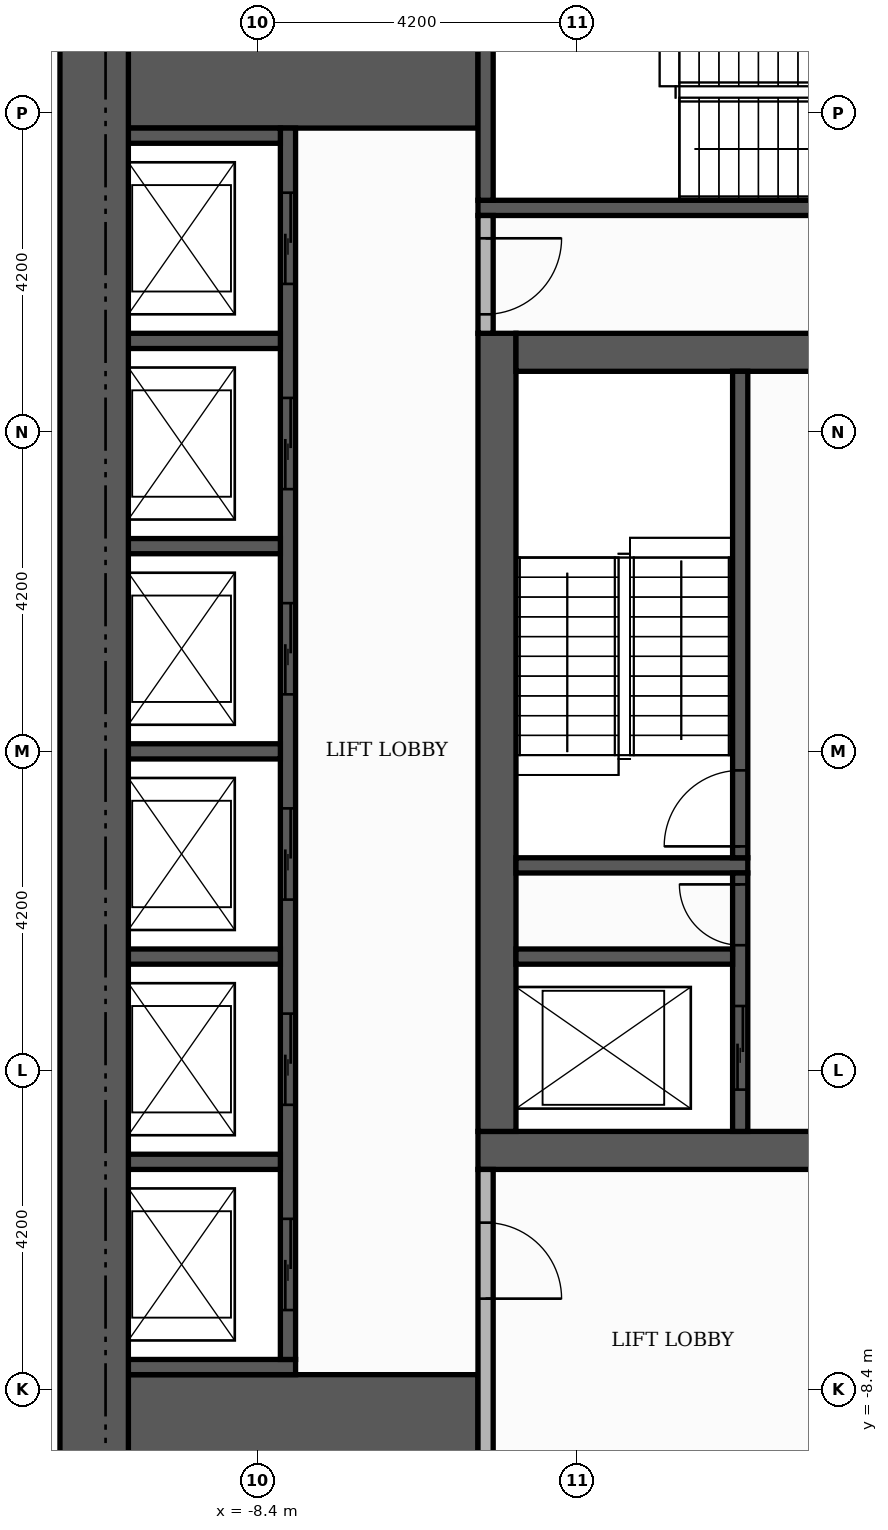
"""IFC4 building model, lengths in metres.
Left out: names, types, materials, properties, quantities, classifications, styles, units other than length and angle.
Written with IfcOpenShell. Run it as: python <this file> out.ifc"""

import sys

from ifc_helpers import new_model, si_unit, direction, frame, frame_2d, origin, place, context, subcontext, project, spatial, rectangle, extrude, element, fill, save


model = new_model("IFC4")
c1 = context("Model", 3, precision=1e-05, world=origin(), true_north=direction((0.0, 1.0)))
c2 = subcontext(c1, "Body", "Model", "MODEL_VIEW")
j1 = project(units=[si_unit("LENGTHUNIT", "METRE"), si_unit("PLANEANGLEUNIT", "RADIAN")], contexts=[c1])
p1 = place(None, origin())
s1 = spatial("IfcSite", under=j1, at=p1, CompositionType="ELEMENT")
p2 = place(p1, origin())
s2 = spatial("IfcBuilding", under=s1, at=p2, CompositionType="ELEMENT")
p3 = place(p2, frame((0.0, 0.0, 126.0)))
s3 = spatial("IfcBuildingStorey", under=s2, at=p3, CompositionType="ELEMENT", Elevation=126.0)
p4 = place(p3, frame((-5.5, -5.25, 0.0), z_axis=(0.0, 0.0, 1.0), x_axis=(1.0, 0.0, 0.0)))
e1 = element("IfcWall", 1, at=p4, inside=s3, PredefinedType="SHEAR", context=c2, shape_type="SweptSolid", body=[
    extrude(rectangle(XDim=11.0, YDim=0.5, at=frame_2d((5.5, 0.0))), origin(), (0.0, 0.0, 1.0), 7.38),
])
p5 = place(p4, frame((4.9, 0.0, 0.0)))
e2 = element("IfcOpeningElement", 2, at=p5, cuts=e1, PredefinedType="OPENING", context=c2, shape_type="SweptSolid", body=[
    extrude(rectangle(XDim=1.2, YDim=2.1, at=frame_2d((0.6, 1.05))), frame((0.0, 0.26, 0.0), z_axis=(0.0, -1.0, 0.0), x_axis=(1.0, 0.0, 0.0)), (0.0, 0.0, 1.0), 0.52),
])
p6 = place(p3, frame((-5.25, -5.0, 0.0), z_axis=(0.0, 0.0, 1.0), x_axis=(0.0, 1.0, 0.0)))
e3 = element("IfcWall", 3, at=p6, inside=s3, PredefinedType="SHEAR", context=c2, shape_type="SweptSolid", body=[
    extrude(rectangle(XDim=10.5, YDim=0.5, at=frame_2d((5.25, 0.0))), origin(), (0.0, 0.0, 1.0), 7.38),
])
p7 = place(p3, frame((-5.0, 5.25, 0.0), z_axis=(0.0, 0.0, 1.0), x_axis=(1.0, 0.0, 0.0)))
e4 = element("IfcWall", 4, at=p7, inside=s3, PredefinedType="SHEAR", context=c2, shape_type="SweptSolid", body=[
    extrude(rectangle(XDim=10.0, YDim=0.5, at=frame_2d((5.0, 0.0))), origin(), (0.0, 0.0, 1.0), 7.38),
])
p8 = place(p7, frame((4.4, 0.0, 0.0)))
e5 = element("IfcOpeningElement", 5, at=p8, cuts=e4, PredefinedType="OPENING", context=c2, shape_type="SweptSolid", body=[
    extrude(rectangle(XDim=1.2, YDim=2.1, at=frame_2d((0.6, 1.05))), frame((0.0, 0.26, 0.0), z_axis=(0.0, -1.0, 0.0), x_axis=(1.0, 0.0, 0.0)), (0.0, 0.0, 1.0), 0.52),
])
for number, where, z_axis, x_axis in (
    (6, (-10.1, -9.15, 0.0), (0.0, 0.0, 1.0), (1.0, 0.0, 0.0)),
    (7, (-10.1, 9.15, 0.0), (0.0, 0.0, 1.0), (1.0, 0.0, 0.0)),
):
    element("IfcWall", number, at=place(p3, frame(where, z_axis=z_axis, x_axis=x_axis)), inside=s3, PredefinedType="SHEAR", context=c2, shape_type="SweptSolid", body=[
        extrude(rectangle(XDim=4.6, YDim=1.9, at=frame_2d((2.3, 0.0))), origin(), (0.0, 0.0, 1.0), 7.38),
    ])
p9 = place(p3, frame((-5.0, -1.5, 0.0), z_axis=(0.0, 0.0, 1.0), x_axis=(1.0, 0.0, 0.0)))
e8 = element("IfcWall", 8, at=p9, inside=s3, PredefinedType="SHEAR", context=c2, shape_type="SweptSolid", body=[
    extrude(rectangle(XDim=3.05, YDim=0.2, at=frame_2d((1.525, 0.0))), origin(), (0.0, 0.0, 1.0), 7.38),
])
p10 = place(p3, frame((-2.05, -1.4, 0.0), z_axis=(0.0, 0.0, 1.0), x_axis=(0.0, 1.0, 0.0)))
e9 = element("IfcWall", 9, at=p10, inside=s3, PredefinedType="SHEAR", context=c2, shape_type="SweptSolid", body=[
    extrude(rectangle(XDim=6.4, YDim=0.2, at=frame_2d((3.2, 0.0))), origin(), (0.0, 0.0, 1.0), 7.38),
])
p11 = place(p10, frame((0.15, 0.0, 0.0)))
e10 = element("IfcOpeningElement", 10, at=p11, cuts=e9, PredefinedType="OPENING", context=c2, shape_type="SweptSolid", body=[
    extrude(rectangle(XDim=1.0, YDim=2.1, at=frame_2d((0.5, 1.05))), frame((0.0, 0.11, 0.0), z_axis=(0.0, -1.0, 0.0), x_axis=(1.0, 0.0, 0.0)), (0.0, 0.0, 1.0), 0.22),
])
p12 = place(p3, frame((-5.5, 7.15, 0.0), z_axis=(0.0, 0.0, 1.0), x_axis=(1.0, 0.0, 0.0)))
e11 = element("IfcWall", 11, at=p12, inside=s3, PredefinedType="SHEAR", context=c2, shape_type="SweptSolid", body=[
    extrude(rectangle(XDim=6.8, YDim=0.2, at=frame_2d((3.4, 0.0))), origin(), (0.0, 0.0, 1.0), 7.38),
])
p13 = place(p3, frame((-5.4, 7.25, 0.0), z_axis=(0.0, 0.0, 1.0), x_axis=(0.0, 1.0, 0.0)))
e12 = element("IfcWall", 12, at=p13, inside=s3, PredefinedType="SHEAR", context=c2, shape_type="SweptSolid", body=[
    extrude(rectangle(XDim=2.85, YDim=0.2, at=frame_2d((1.425, 0.0))), origin(), (0.0, 0.0, 1.0), 7.38),
])
p14 = place(p3, frame((-10.1, -8.1, 0.0), z_axis=(0.0, 0.0, 1.0), x_axis=(1.0, 0.0, 0.0)))
e13 = element("IfcWall", 13, at=p14, inside=s3, PredefinedType="SHEAR", context=c2, shape_type="SweptSolid", body=[
    extrude(rectangle(XDim=2.2, YDim=0.2, at=frame_2d((1.1, 0.0))), origin(), (0.0, 0.0, 1.0), 7.38),
])
p15 = place(p3, frame((-8.0, -8.0, 0.0), z_axis=(0.0, 0.0, 1.0), x_axis=(0.0, 1.0, 0.0)))
e14 = element("IfcWall", 14, at=p15, inside=s3, PredefinedType="SHEAR", context=c2, shape_type="SweptSolid", body=[
    extrude(rectangle(XDim=16.2, YDim=0.2, at=frame_2d((8.1, 0.0))), origin(), (0.0, 0.0, 1.0), 7.38),
])
p16 = place(p15, frame((0.65, 0.0, 0.0)))
e15 = element("IfcOpeningElement", 15, at=p16, cuts=e14, PredefinedType="OPENING", context=c2, shape_type="SweptSolid", body=[
    extrude(rectangle(XDim=1.2, YDim=2.1, at=frame_2d((0.6, 1.05))), frame((0.0, 0.11, 0.0), z_axis=(0.0, -1.0, 0.0), x_axis=(1.0, 0.0, 0.0)), (0.0, 0.0, 1.0), 0.22),
])
p17 = place(p15, frame((3.35, 0.0, 0.0)))
e16 = element("IfcOpeningElement", 16, at=p17, cuts=e14, PredefinedType="OPENING", context=c2, shape_type="SweptSolid", body=[
    extrude(rectangle(XDim=1.2, YDim=2.1, at=frame_2d((0.6, 1.05))), frame((0.0, 0.11, 0.0), z_axis=(0.0, -1.0, 0.0), x_axis=(1.0, 0.0, 0.0)), (0.0, 0.0, 1.0), 0.22),
])
p18 = place(p15, frame((6.05, 0.0, 0.0)))
e17 = element("IfcOpeningElement", 17, at=p18, cuts=e14, PredefinedType="OPENING", context=c2, shape_type="SweptSolid", body=[
    extrude(rectangle(XDim=1.2, YDim=2.1, at=frame_2d((0.6, 1.05))), frame((0.0, 0.11, 0.0), z_axis=(0.0, -1.0, 0.0), x_axis=(1.0, 0.0, 0.0)), (0.0, 0.0, 1.0), 0.22),
])
p19 = place(p15, frame((8.75, 0.0, 0.0)))
e18 = element("IfcOpeningElement", 18, at=p19, cuts=e14, PredefinedType="OPENING", context=c2, shape_type="SweptSolid", body=[
    extrude(rectangle(XDim=1.2, YDim=2.1, at=frame_2d((0.6, 1.05))), frame((0.0, 0.11, 0.0), z_axis=(0.0, -1.0, 0.0), x_axis=(1.0, 0.0, 0.0)), (0.0, 0.0, 1.0), 0.22),
])
p20 = place(p15, frame((11.45, 0.0, 0.0)))
e19 = element("IfcOpeningElement", 19, at=p20, cuts=e14, PredefinedType="OPENING", context=c2, shape_type="SweptSolid", body=[
    extrude(rectangle(XDim=1.2, YDim=2.1, at=frame_2d((0.6, 1.05))), frame((0.0, 0.11, 0.0), z_axis=(0.0, -1.0, 0.0), x_axis=(1.0, 0.0, 0.0)), (0.0, 0.0, 1.0), 0.22),
])
p21 = place(p15, frame((14.15, 0.0, 0.0)))
e20 = element("IfcOpeningElement", 20, at=p21, cuts=e14, PredefinedType="OPENING", context=c2, shape_type="SweptSolid", body=[
    extrude(rectangle(XDim=1.2, YDim=2.1, at=frame_2d((0.6, 1.05))), frame((0.0, 0.11, 0.0), z_axis=(0.0, -1.0, 0.0), x_axis=(1.0, 0.0, 0.0)), (0.0, 0.0, 1.0), 0.22),
])
p22 = place(p3, frame((-10.1, -5.4, 0.0), z_axis=(0.0, 0.0, 1.0), x_axis=(1.0, 0.0, 0.0)))
e21 = element("IfcWall", 21, at=p22, inside=s3, PredefinedType="SHEAR", context=c2, shape_type="SweptSolid", body=[
    extrude(rectangle(XDim=2.0, YDim=0.2, at=frame_2d((1.0, 0.0))), origin(), (0.0, 0.0, 1.0), 7.38),
])
p23 = place(p3, frame((-2.05, -5.0, 0.0), z_axis=(0.0, 0.0, 1.0), x_axis=(0.0, 1.0, 0.0)))
e22 = element("IfcWall", 22, at=p23, inside=s3, PredefinedType="SHEAR", context=c2, shape_type="SweptSolid", body=[
    extrude(rectangle(XDim=3.4, YDim=0.2, at=frame_2d((1.7, 0.0))), origin(), (0.0, 0.0, 1.0), 7.38),
])
p24 = place(p23, frame((0.55, 0.0, 0.0)))
e23 = element("IfcOpeningElement", 23, at=p24, cuts=e22, PredefinedType="OPENING", context=c2, shape_type="SweptSolid", body=[
    extrude(rectangle(XDim=1.1, YDim=2.1, at=frame_2d((0.55, 1.05))), frame((0.0, 0.11, 0.0), z_axis=(0.0, -1.0, 0.0), x_axis=(1.0, 0.0, 0.0)), (0.0, 0.0, 1.0), 0.22),
])
p25 = place(p23, frame((2.45, 0.0, 0.0)))
e24 = element("IfcOpeningElement", 24, at=p25, cuts=e22, PredefinedType="OPENING", context=c2, shape_type="SweptSolid", body=[
    extrude(rectangle(XDim=0.8, YDim=2.1, at=frame_2d((0.4, 1.05))), frame((0.0, 0.11, 0.0), z_axis=(0.0, -1.0, 0.0), x_axis=(1.0, 0.0, 0.0)), (0.0, 0.0, 1.0), 0.22),
])
p26 = place(p3, frame((-10.1, -2.7, 0.0), z_axis=(0.0, 0.0, 1.0), x_axis=(1.0, 0.0, 0.0)))
e25 = element("IfcWall", 25, at=p26, inside=s3, PredefinedType="SHEAR", context=c2, shape_type="SweptSolid", body=[
    extrude(rectangle(XDim=2.0, YDim=0.2, at=frame_2d((1.0, 0.0))), origin(), (0.0, 0.0, 1.0), 7.38),
])
p27 = place(p3, frame((-5.0, -2.7, 0.0), z_axis=(0.0, 0.0, 1.0), x_axis=(1.0, 0.0, 0.0)))
e26 = element("IfcWall", 26, at=p27, inside=s3, PredefinedType="SHEAR", context=c2, shape_type="SweptSolid", body=[
    extrude(rectangle(XDim=2.85, YDim=0.2, at=frame_2d((1.425, 0.0))), origin(), (0.0, 0.0, 1.0), 7.38),
])
for number, where, z_axis, x_axis in (
    (27, (-10.1, 0.0, 0.0), (0.0, 0.0, 1.0), (1.0, 0.0, 0.0)),
    (28, (-10.1, 2.7, 0.0), (0.0, 0.0, 1.0), (1.0, 0.0, 0.0)),
    (29, (-10.1, 5.4, 0.0), (0.0, 0.0, 1.0), (1.0, 0.0, 0.0)),
    (30, (-10.1, 8.1, 0.0), (0.0, 0.0, 1.0), (1.0, 0.0, 0.0)),
):
    element("IfcWall", number, at=place(p3, frame(where, z_axis=z_axis, x_axis=x_axis)), inside=s3, PredefinedType="SHEAR", context=c2, shape_type="SweptSolid", body=[
        extrude(rectangle(XDim=2.0, YDim=0.2, at=frame_2d((1.0, 0.0))), origin(), (0.0, 0.0, 1.0), 7.38),
    ])
p28 = place(p3, frame((-10.55, -10.1, 0.0), z_axis=(0.0, 0.0, 1.0), x_axis=(0.0, 1.0, 0.0)))
e31 = element("IfcWall", 31, at=p28, inside=s3, PredefinedType="SHEAR", context=c2, shape_type="SweptSolid", body=[
    extrude(rectangle(XDim=20.2, YDim=0.9, at=frame_2d((10.1, 0.0))), origin(), (0.0, 0.0, 1.0), 7.38),
])
p29 = place(p3, frame((-5.4, -10.1, 0.0), z_axis=(0.0, 0.0, 1.0), x_axis=(0.0, 1.0, 0.0)))
e32 = element("IfcWall", 32, at=p29, inside=s3, PredefinedType="PARTITIONING", context=c2, shape_type="SweptSolid", body=[
    extrude(rectangle(XDim=4.6, YDim=0.2, at=frame_2d((2.3, 0.0))), origin(), (0.0, 0.0, 1.0), 7.38),
])
p30 = place(p29, frame((2.9, 0.0, 0.0)))
e33 = element("IfcOpeningElement", 33, at=p30, cuts=e32, PredefinedType="OPENING", context=c2, shape_type="SweptSolid", body=[
    extrude(rectangle(XDim=1.0, YDim=2.1, at=frame_2d((0.5, 1.05))), frame((0.0, 0.11, 0.0), z_axis=(0.0, -1.0, 0.0), x_axis=(1.0, 0.0, 0.0)), (0.0, 0.0, 1.0), 0.22),
])
p31 = place(p3, frame((-5.4, 5.5, 0.0), z_axis=(0.0, 0.0, 1.0), x_axis=(0.0, 1.0, 0.0)))
e34 = element("IfcWall", 34, at=p31, inside=s3, PredefinedType="PARTITIONING", context=c2, shape_type="SweptSolid", body=[
    extrude(rectangle(XDim=1.55, YDim=0.2, at=frame_2d((0.775, 0.0))), origin(), (0.0, 0.0, 1.0), 7.38),
])
p32 = place(p31, frame((0.25, 0.0, 0.0)))
e35 = element("IfcOpeningElement", 35, at=p32, cuts=e34, PredefinedType="OPENING", context=c2, shape_type="SweptSolid", body=[
    extrude(rectangle(XDim=1.0, YDim=2.1, at=frame_2d((0.5, 1.05))), frame((0.0, 0.11, 0.0), z_axis=(0.0, -1.0, 0.0), x_axis=(1.0, 0.0, 0.0)), (0.0, 0.0, 1.0), 0.22),
])
p33 = place(p16, origin())
e36 = element("IfcDoor", 36, at=p33, inside=s3, OperationType="SLIDING_TO_LEFT", PredefinedType="DOOR", context=c2, shape_type="SweptSolid", body=[
    extrude(rectangle(XDim=1.2, YDim=2.1, at=frame_2d((0.6, 1.05))), frame((0.0, 0.025, 0.0), z_axis=(0.0, -1.0, 0.0), x_axis=(1.0, 0.0, 0.0)), (0.0, 0.0, 1.0), 0.05),
])
fill(e15, e36)
p34 = place(p17, origin())
e37 = element("IfcDoor", 37, at=p34, inside=s3, OperationType="SLIDING_TO_LEFT", PredefinedType="DOOR", context=c2, shape_type="SweptSolid", body=[
    extrude(rectangle(XDim=1.2, YDim=2.1, at=frame_2d((0.6, 1.05))), frame((0.0, 0.025, 0.0), z_axis=(0.0, -1.0, 0.0), x_axis=(1.0, 0.0, 0.0)), (0.0, 0.0, 1.0), 0.05),
])
fill(e16, e37)
p35 = place(p18, origin())
e38 = element("IfcDoor", 38, at=p35, inside=s3, OperationType="SLIDING_TO_LEFT", PredefinedType="DOOR", context=c2, shape_type="SweptSolid", body=[
    extrude(rectangle(XDim=1.2, YDim=2.1, at=frame_2d((0.6, 1.05))), frame((0.0, 0.025, 0.0), z_axis=(0.0, -1.0, 0.0), x_axis=(1.0, 0.0, 0.0)), (0.0, 0.0, 1.0), 0.05),
])
fill(e17, e38)
p36 = place(p19, origin())
e39 = element("IfcDoor", 39, at=p36, inside=s3, OperationType="SLIDING_TO_LEFT", PredefinedType="DOOR", context=c2, shape_type="SweptSolid", body=[
    extrude(rectangle(XDim=1.2, YDim=2.1, at=frame_2d((0.6, 1.05))), frame((0.0, 0.025, 0.0), z_axis=(0.0, -1.0, 0.0), x_axis=(1.0, 0.0, 0.0)), (0.0, 0.0, 1.0), 0.05),
])
fill(e18, e39)
p37 = place(p20, origin())
e40 = element("IfcDoor", 40, at=p37, inside=s3, OperationType="SLIDING_TO_LEFT", PredefinedType="DOOR", context=c2, shape_type="SweptSolid", body=[
    extrude(rectangle(XDim=1.2, YDim=2.1, at=frame_2d((0.6, 1.05))), frame((0.0, 0.025, 0.0), z_axis=(0.0, -1.0, 0.0), x_axis=(1.0, 0.0, 0.0)), (0.0, 0.0, 1.0), 0.05),
])
fill(e19, e40)
p38 = place(p21, origin())
e41 = element("IfcDoor", 41, at=p38, inside=s3, OperationType="SLIDING_TO_LEFT", PredefinedType="DOOR", context=c2, shape_type="SweptSolid", body=[
    extrude(rectangle(XDim=1.2, YDim=2.1, at=frame_2d((0.6, 1.05))), frame((0.0, 0.025, 0.0), z_axis=(0.0, -1.0, 0.0), x_axis=(1.0, 0.0, 0.0)), (0.0, 0.0, 1.0), 0.05),
])
fill(e20, e41)
p39 = place(p24, origin())
e42 = element("IfcDoor", 42, at=p39, inside=s3, OperationType="SLIDING_TO_LEFT", PredefinedType="DOOR", context=c2, shape_type="SweptSolid", body=[
    extrude(rectangle(XDim=1.1, YDim=2.1, at=frame_2d((0.55, 1.05))), frame((0.0, 0.025, 0.0), z_axis=(0.0, -1.0, 0.0), x_axis=(1.0, 0.0, 0.0)), (0.0, 0.0, 1.0), 0.05),
])
fill(e23, e42)
p40 = place(p11, origin())
e43 = element("IfcDoor", 43, at=p40, inside=s3, OperationType="SINGLE_SWING_LEFT", PredefinedType="DOOR", context=c2, shape_type="SweptSolid", body=[
    extrude(rectangle(XDim=1.0, YDim=2.1, at=frame_2d((0.5, 1.05))), frame((0.0, 0.025, 0.0), z_axis=(0.0, -1.0, 0.0), x_axis=(1.0, 0.0, 0.0)), (0.0, 0.0, 1.0), 0.05),
])
fill(e10, e43)
p41 = place(p25, origin())
e44 = element("IfcDoor", 44, at=p41, inside=s3, OperationType="SINGLE_SWING_RIGHT", PredefinedType="DOOR", context=c2, shape_type="SweptSolid", body=[
    extrude(rectangle(XDim=0.8, YDim=2.1, at=frame_2d((0.4, 1.05))), frame((0.0, 0.025, 0.0), z_axis=(0.0, -1.0, 0.0), x_axis=(1.0, 0.0, 0.0)), (0.0, 0.0, 1.0), 0.05),
])
fill(e24, e44)
p42 = place(p32, frame((1.0, 0.0, 0.0), z_axis=(0.0, 0.0, 1.0), x_axis=(-1.0, 0.0, 0.0)))
e45 = element("IfcDoor", 45, at=p42, inside=s3, OperationType="SINGLE_SWING_RIGHT", PredefinedType="DOOR", context=c2, shape_type="SweptSolid", body=[
    extrude(rectangle(XDim=1.0, YDim=2.1, at=frame_2d((0.5, 1.05))), frame((0.0, 0.025, 0.0), z_axis=(0.0, -1.0, 0.0), x_axis=(1.0, 0.0, 0.0)), (0.0, 0.0, 1.0), 0.05),
])
fill(e35, e45)
p43 = place(p30, frame((1.0, 0.0, 0.0), z_axis=(0.0, 0.0, 1.0), x_axis=(-1.0, 0.0, 0.0)))
e46 = element("IfcDoor", 46, at=p43, inside=s3, OperationType="SINGLE_SWING_LEFT", PredefinedType="DOOR", context=c2, shape_type="SweptSolid", body=[
    extrude(rectangle(XDim=1.0, YDim=2.1, at=frame_2d((0.5, 1.05))), frame((0.0, 0.025, 0.0), z_axis=(0.0, -1.0, 0.0), x_axis=(1.0, 0.0, 0.0)), (0.0, 0.0, 1.0), 0.05),
])
fill(e33, e46)
save(model, sys.argv[1])
